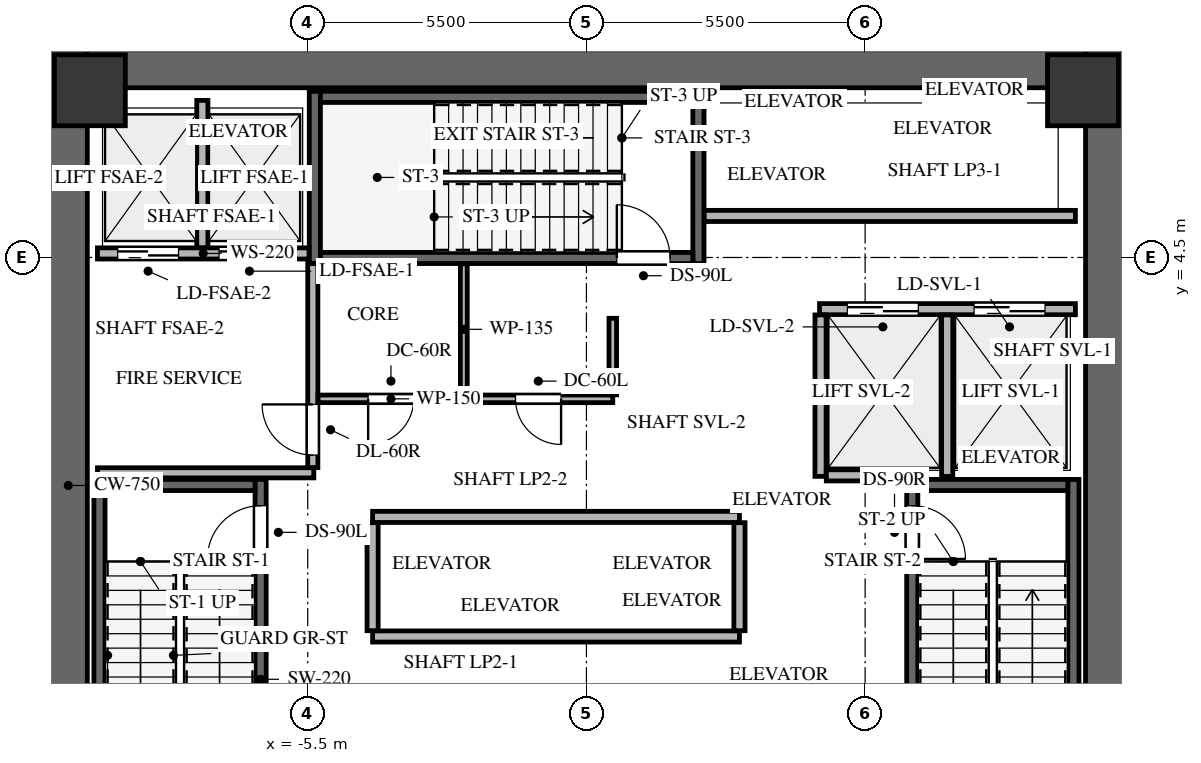
"""IFC4 building model, lengths in metres.
Left out: names, types, materials, properties, quantities, classifications, styles, units other than length and angle.
Written with IfcOpenShell. Run it as: python <this file> out.ifc"""

import sys

from ifc_helpers import new_model, si_unit, direction, frame, frame_2d, origin, origin_2d, place, context, subcontext, project, spatial, rectangle, extrude, source, transform, mapped, element, fill, save


model = new_model("IFC4")
c1 = context("Model", 3, precision=1e-05, world=origin(), true_north=direction((0.0, 1.0)))
c2 = subcontext(c1, "Body", "Model", "MODEL_VIEW")
j1 = project(units=[si_unit("LENGTHUNIT", "METRE"), si_unit("PLANEANGLEUNIT", "RADIAN")], contexts=[c1])
p1 = place(None, origin())
s1 = spatial("IfcSite", under=j1, at=p1, CompositionType="ELEMENT")
p2 = place(p1, origin())
s2 = spatial("IfcBuilding", under=s1, at=p2, CompositionType="ELEMENT")
p3 = place(p2, frame((0.0, 0.0, 88.5)))
s3 = spatial("IfcBuildingStorey", under=s2, at=p3, CompositionType="ELEMENT", Elevation=88.5)
for number, where, z_axis, x_axis in (
    (1, (-10.225, -8.6, 0.0), (0.0, 0.0, 1.0), (0.0, 1.0, 0.0)),
    (2, (10.225, -8.6, 0.0), (0.0, 0.0, 1.0), (0.0, 1.0, 0.0)),
):
    element("IfcWall", number, at=place(p3, frame(where, z_axis=z_axis, x_axis=x_axis)), inside=s3, PredefinedType="SHEAR", context=c2, shape_type="SweptSolid", body=[
        extrude(rectangle(XDim=17.2, YDim=0.75, at=frame_2d((8.6, 0.0))), origin(), (0.0, 0.0, 1.0), 4.8),
    ])
p4 = place(p3, frame((-9.85, 8.225, 0.0), z_axis=(0.0, 0.0, 1.0), x_axis=(1.0, 0.0, 0.0)))
e3 = element("IfcWall", 3, at=p4, inside=s3, PredefinedType="SHEAR", context=c2, shape_type="SweptSolid", body=[
    extrude(rectangle(XDim=19.7, YDim=0.75, at=frame_2d((9.85, 0.0))), origin(), (0.0, 0.0, 1.0), 4.8),
])
p5 = place(p3, frame((-6.43, -7.77, -0.3), z_axis=(0.0, 0.0, 1.0), x_axis=(0.0, 1.0, 0.0)))
e4 = element("IfcWall", 4, at=p5, inside=s3, PredefinedType="SHEAR", context=c2, shape_type="SweptSolid", body=[
    extrude(rectangle(XDim=7.89, YDim=0.22, at=frame_2d((3.945, 0.0))), origin(), (0.0, 0.0, 1.0), 4.8),
])
p6 = place(p5, frame((6.32, 0.0, 0.0)))
e5 = element("IfcOpeningElement", 5, at=p6, cuts=e4, PredefinedType="OPENING", context=c2, shape_type="SweptSolid", body=[
    extrude(rectangle(XDim=1.05, YDim=2.15, at=frame_2d((0.525, 1.075))), frame((0.0, 0.12, 0.0), z_axis=(0.0, -1.0, 0.0), x_axis=(1.0, 0.0, 0.0)), (0.0, 0.0, 1.0), 0.24),
])
p7 = place(p3, frame((-9.61, 0.12, -0.3), z_axis=(0.0, 0.0, 1.0), x_axis=(0.0, -1.0, 0.0)))
e6 = element("IfcWall", 6, at=p7, inside=s3, PredefinedType="SHEAR", context=c2, shape_type="SweptSolid", body=[
    extrude(rectangle(XDim=7.89, YDim=0.22, at=frame_2d((3.945, 0.0))), origin(), (0.0, 0.0, 1.0), 4.8),
])
p8 = place(p3, frame((-6.54, 0.01, -0.3), z_axis=(0.0, 0.0, 1.0), x_axis=(-1.0, 0.0, 0.0)))
e7 = element("IfcWall", 7, at=p8, inside=s3, PredefinedType="SHEAR", context=c2, shape_type="SweptSolid", body=[
    extrude(rectangle(XDim=2.96, YDim=0.22, at=frame_2d((1.48, 0.0))), origin(), (0.0, 0.0, 1.0), 4.8),
])
p9 = place(p3, frame((9.61, -7.77, -0.3), z_axis=(0.0, 0.0, 1.0), x_axis=(0.0, 1.0, 0.0)))
e8 = element("IfcWall", 8, at=p9, inside=s3, PredefinedType="SHEAR", context=c2, shape_type="SweptSolid", body=[
    extrude(rectangle(XDim=7.89, YDim=0.22, at=frame_2d((3.945, 0.0))), origin(), (0.0, 0.0, 1.0), 4.8),
])
p10 = place(p3, frame((6.43, 0.12, -0.3), z_axis=(0.0, 0.0, 1.0), x_axis=(0.0, -1.0, 0.0)))
e9 = element("IfcWall", 9, at=p10, inside=s3, PredefinedType="SHEAR", context=c2, shape_type="SweptSolid", body=[
    extrude(rectangle(XDim=7.89, YDim=0.22, at=frame_2d((3.945, 0.0))), origin(), (0.0, 0.0, 1.0), 4.8),
])
p11 = place(p10, frame((0.52, 0.0, 0.0)))
e10 = element("IfcOpeningElement", 10, at=p11, cuts=e9, PredefinedType="OPENING", context=c2, shape_type="SweptSolid", body=[
    extrude(rectangle(XDim=1.05, YDim=2.15, at=frame_2d((0.525, 1.075))), frame((0.0, 0.12, 0.0), z_axis=(0.0, -1.0, 0.0), x_axis=(1.0, 0.0, 0.0)), (0.0, 0.0, 1.0), 0.24),
])
p12 = place(p3, frame((9.5, 0.01, -0.3), z_axis=(0.0, 0.0, 1.0), x_axis=(-1.0, 0.0, 0.0)))
e11 = element("IfcWall", 11, at=p12, inside=s3, PredefinedType="SHEAR", context=c2, shape_type="SweptSolid", body=[
    extrude(rectangle(XDim=2.96, YDim=0.22, at=frame_2d((1.48, 0.0))), origin(), (0.0, 0.0, 1.0), 4.8),
])
for number, where, z_axis, x_axis in (
    (12, (2.21, 4.38, -0.3), (0.0, 0.0, 1.0), (0.0, 1.0, 0.0)),
    (13, (-5.36, 7.78, -0.3), (0.0, 0.0, 1.0), (0.0, -1.0, 0.0)),
):
    element("IfcWall", number, at=place(p3, frame(where, z_axis=z_axis, x_axis=x_axis)), inside=s3, PredefinedType="SHEAR", context=c2, shape_type="SweptSolid", body=[
        extrude(rectangle(XDim=3.4, YDim=0.22, at=frame_2d((1.7, 0.0))), origin(), (0.0, 0.0, 1.0), 4.8),
    ])
p13 = place(p3, frame((-5.25, 4.49, -0.3), z_axis=(0.0, 0.0, 1.0), x_axis=(1.0, 0.0, 0.0)))
e14 = element("IfcWall", 14, at=p13, inside=s3, PredefinedType="SHEAR", context=c2, shape_type="SweptSolid", body=[
    extrude(rectangle(XDim=7.35, YDim=0.22, at=frame_2d((3.675, 0.0))), origin(), (0.0, 0.0, 1.0), 4.8),
])
p14 = place(p13, frame((5.85, 0.0, 0.0)))
e15 = element("IfcOpeningElement", 15, at=p14, cuts=e14, PredefinedType="OPENING", context=c2, shape_type="SweptSolid", body=[
    extrude(rectangle(XDim=1.05, YDim=2.15, at=frame_2d((0.525, 1.075))), frame((0.0, 0.12, 0.0), z_axis=(0.0, -1.0, 0.0), x_axis=(1.0, 0.0, 0.0)), (0.0, 0.0, 1.0), 0.24),
])
p15 = place(p3, frame((2.1, 7.67, -0.3), z_axis=(0.0, 0.0, 1.0), x_axis=(-1.0, 0.0, 0.0)))
e16 = element("IfcWall", 16, at=p15, inside=s3, PredefinedType="SHEAR", context=c2, shape_type="SweptSolid", body=[
    extrude(rectangle(XDim=7.35, YDim=0.22, at=frame_2d((3.675, 0.0))), origin(), (0.0, 0.0, 1.0), 4.8),
])
m1 = source(origin(), c2, "Body", "SweptSolid", [
    extrude(rectangle(XDim=1.4, YDim=1.4, at=origin_2d()), origin(), (0.0, 0.0, 1.0), 4.8),
])
for number, where, z_axis, x_axis in (
    (17, (9.8, 7.8, -0.3), (0.0, 0.0, 1.0), (1.0, 0.0, 0.0)),
    (18, (-9.8, 7.8, -0.3), (0.0, 0.0, 1.0), (1.0, 0.0, 0.0)),
):
    element("IfcColumn", number, at=place(p3, frame(where, z_axis=z_axis, x_axis=x_axis)), inside=s3, PredefinedType="COLUMN", context=c2, shape_type="MappedRepresentation", body=[
        mapped(m1, transform((0.0, 0.0, 0.0), x_axis=(1.0, 0.0, 0.0), y_axis=(0.0, 1.0, 0.0), z_axis=(0.0, 0.0, 1.0), scale=1.0)),
    ])
p16 = place(p3, frame((-9.65, 4.58, 0.0), z_axis=(0.0, 0.0, 1.0), x_axis=(1.0, 0.0, 0.0)))
e19 = element("IfcWall", 19, at=p16, inside=s3, PredefinedType="SOLIDWALL", context=c2, shape_type="SweptSolid", body=[
    extrude(rectangle(XDim=4.175, YDim=0.22, at=frame_2d((2.087, 0.0))), origin(), (0.0, 0.0, 1.0), 4.485),
])
p17 = place(p16, frame((0.4, 0.0, 0.0)))
e20 = element("IfcOpeningElement", 20, at=p17, cuts=e19, PredefinedType="OPENING", context=c2, shape_type="SweptSolid", body=[
    extrude(rectangle(XDim=1.2, YDim=2.15, at=frame_2d((0.6, 1.075))), frame((0.0, 0.12, 0.0), z_axis=(0.0, -1.0, 0.0), x_axis=(1.0, 0.0, 0.0)), (0.0, 0.0, 1.0), 0.24),
])
p18 = place(p16, frame((2.4, 0.0, 0.0)))
e21 = element("IfcOpeningElement", 21, at=p18, cuts=e19, PredefinedType="OPENING", context=c2, shape_type="SweptSolid", body=[
    extrude(rectangle(XDim=1.2, YDim=2.15, at=frame_2d((0.6, 1.075))), frame((0.0, 0.12, 0.0), z_axis=(0.0, -1.0, 0.0), x_axis=(1.0, 0.0, 0.0)), (0.0, 0.0, 1.0), 0.24),
])
p19 = place(p3, frame((-7.58, 4.694, 0.0), z_axis=(0.0, 0.0, 1.0), x_axis=(0.0, 1.0, 0.0)))
e22 = element("IfcWall", 22, at=p19, inside=s3, PredefinedType="SOLIDWALL", context=c2, shape_type="SweptSolid", body=[
    extrude(rectangle(XDim=2.906, YDim=0.22, at=frame_2d((1.453, 0.0))), origin(), (0.0, 0.0, 1.0), 4.485),
])
p20 = place(p3, frame((-9.65, 0.25, 0.0), z_axis=(0.0, 0.0, 1.0), x_axis=(1.0, 0.0, 0.0)))
e23 = element("IfcWall", 23, at=p20, inside=s3, PredefinedType="SOLIDWALL", context=c2, shape_type="SweptSolid", body=[
    extrude(rectangle(XDim=4.27, YDim=0.2, at=frame_2d((2.135, 0.0))), origin(), (0.0, 0.0, 1.0), 4.485),
])
p21 = place(p3, frame((-5.4, 0.354, 0.0), z_axis=(0.0, 0.0, 1.0), x_axis=(0.0, 1.0, 0.0)))
e24 = element("IfcWall", 24, at=p21, inside=s3, PredefinedType="SOLIDWALL", context=c2, shape_type="SweptSolid", body=[
    extrude(rectangle(XDim=4.026, YDim=0.2, at=frame_2d((2.013, 0.0))), origin(), (0.0, 0.0, 1.0), 4.485),
])
p22 = place(p21, frame((0.246, 0.0, 0.0)))
e25 = element("IfcOpeningElement", 25, at=p22, cuts=e24, PredefinedType="OPENING", context=c2, shape_type="SweptSolid", body=[
    extrude(rectangle(XDim=1.0, YDim=2.15, at=frame_2d((0.5, 1.075))), frame((0.0, 0.11, 0.0), z_axis=(0.0, -1.0, 0.0), x_axis=(1.0, 0.0, 0.0)), (0.0, 0.0, 1.0), 0.22),
])
p23 = place(p3, frame((4.6, 3.48, 0.0), z_axis=(0.0, 0.0, 1.0), x_axis=(1.0, 0.0, 0.0)))
e26 = element("IfcWall", 26, at=p23, inside=s3, PredefinedType="SOLIDWALL", context=c2, shape_type="SweptSolid", body=[
    extrude(rectangle(XDim=5.05, YDim=0.22, at=frame_2d((2.525, 0.0))), origin(), (0.0, 0.0, 1.0), 4.485),
])
p24 = place(p23, frame((0.55, 0.0, 0.0)))
e27 = element("IfcOpeningElement", 27, at=p24, cuts=e26, PredefinedType="OPENING", context=c2, shape_type="SweptSolid", body=[
    extrude(rectangle(XDim=1.4, YDim=2.15, at=frame_2d((0.7, 1.075))), frame((0.0, 0.12, 0.0), z_axis=(0.0, -1.0, 0.0), x_axis=(1.0, 0.0, 0.0)), (0.0, 0.0, 1.0), 0.24),
])
p25 = place(p23, frame((3.05, 0.0, 0.0)))
e28 = element("IfcOpeningElement", 28, at=p25, cuts=e26, PredefinedType="OPENING", context=c2, shape_type="SweptSolid", body=[
    extrude(rectangle(XDim=1.4, YDim=2.15, at=frame_2d((0.7, 1.075))), frame((0.0, 0.12, 0.0), z_axis=(0.0, -1.0, 0.0), x_axis=(1.0, 0.0, 0.0)), (0.0, 0.0, 1.0), 0.24),
])
for number, where, z_axis, x_axis in (
    (29, (4.62, 0.18, 0.0), (0.0, 0.0, 1.0), (0.0, 1.0, 0.0)),
    (30, (7.12, 0.18, 0.0), (0.0, 0.0, 1.0), (0.0, 1.0, 0.0)),
):
    element("IfcWall", number, at=place(p3, frame(where, z_axis=z_axis, x_axis=x_axis)), inside=s3, PredefinedType="SOLIDWALL", context=c2, shape_type="SweptSolid", body=[
        extrude(rectangle(XDim=3.186, YDim=0.22, at=frame_2d((1.593, 0.0))), origin(), (0.0, 0.0, 1.0), 4.485),
    ])
p26 = place(p3, frame((4.734, 0.2, 0.0), z_axis=(0.0, 0.0, 1.0), x_axis=(1.0, 0.0, 0.0)))
e31 = element("IfcWall", 31, at=p26, inside=s3, PredefinedType="SOLIDWALL", context=c2, shape_type="SweptSolid", body=[
    extrude(rectangle(XDim=1.666, YDim=0.22, at=frame_2d((0.833, 0.0))), origin(), (0.0, 0.0, 1.0), 4.485),
])
for number, where, z_axis, x_axis in (
    (32, (-4.22, -2.98, 0.0), (0.0, 0.0, 1.0), (1.0, 0.0, 0.0)),
    (33, (-4.22, -0.62, 0.0), (0.0, 0.0, 1.0), (1.0, 0.0, 0.0)),
):
    element("IfcWall", number, at=place(p3, frame(where, z_axis=z_axis, x_axis=x_axis)), inside=s3, PredefinedType="SOLIDWALL", context=c2, shape_type="SweptSolid", body=[
        extrude(rectangle(XDim=7.24, YDim=0.22, at=frame_2d((3.62, 0.0))), origin(), (0.0, 0.0, 1.0), 4.485),
    ])
for number, where, z_axis, x_axis in (
    (34, (-4.22, -2.866, 0.0), (0.0, 0.0, 1.0), (0.0, 1.0, 0.0)),
    (35, (3.02, -2.866, 0.0), (0.0, 0.0, 1.0), (0.0, 1.0, 0.0)),
):
    element("IfcWall", number, at=place(p3, frame(where, z_axis=z_axis, x_axis=x_axis)), inside=s3, PredefinedType="SOLIDWALL", context=c2, shape_type="SweptSolid", body=[
        extrude(rectangle(XDim=2.132, YDim=0.22, at=frame_2d((1.066, 0.0))), origin(), (0.0, 0.0, 1.0), 4.485),
    ])
p27 = place(p3, frame((2.325, 5.32, 0.0), z_axis=(0.0, 0.0, 1.0), x_axis=(1.0, 0.0, 0.0)))
e36 = element("IfcWall", 36, at=p27, inside=s3, PredefinedType="SOLIDWALL", context=c2, shape_type="SweptSolid", body=[
    extrude(rectangle(XDim=7.325, YDim=0.22, at=frame_2d((3.663, 0.0))), origin(), (0.0, 0.0, 1.0), 4.485),
])
p28 = place(p3, frame((-2.42, 1.71, 0.0), z_axis=(0.0, 0.0, 1.0), x_axis=(-1.0, 0.0, 0.0)))
e37 = element("IfcWall", 37, at=p28, inside=s3, PredefinedType="PARTITIONING", context=c2, shape_type="SweptSolid", body=[
    extrude(rectangle(XDim=2.876, YDim=0.15, at=frame_2d((1.438, 0.0))), origin(), (0.0, 0.0, 1.0), 4.485),
])
p29 = place(p28, frame((0.988, 0.0, 0.0)))
e38 = element("IfcOpeningElement", 38, at=p29, cuts=e37, PredefinedType="OPENING", context=c2, shape_type="SweptSolid", body=[
    extrude(rectangle(XDim=0.9, YDim=2.05, at=frame_2d((0.45, 1.025))), frame((0.0, 0.085, 0.0), z_axis=(0.0, -1.0, 0.0), x_axis=(1.0, 0.0, 0.0)), (0.0, 0.0, 1.0), 0.17),
])
p30 = place(p3, frame((0.52, 1.71, 0.0), z_axis=(0.0, 0.0, 1.0), x_axis=(-1.0, 0.0, 0.0)))
e39 = element("IfcWall", 39, at=p30, inside=s3, PredefinedType="PARTITIONING", context=c2, shape_type="SweptSolid", body=[
    extrude(rectangle(XDim=2.94, YDim=0.15, at=frame_2d((1.47, 0.0))), origin(), (0.0, 0.0, 1.0), 4.485),
])
p31 = place(p30, frame((1.02, 0.0, 0.0)))
e40 = element("IfcOpeningElement", 40, at=p31, cuts=e39, PredefinedType="OPENING", context=c2, shape_type="SweptSolid", body=[
    extrude(rectangle(XDim=0.9, YDim=2.05, at=frame_2d((0.45, 1.025))), frame((0.0, 0.085, 0.0), z_axis=(0.0, -1.0, 0.0), x_axis=(1.0, 0.0, 0.0)), (0.0, 0.0, 1.0), 0.17),
])
p32 = place(p3, frame((0.52, 3.3, 0.0), z_axis=(0.0, 0.0, 1.0), x_axis=(0.0, -1.0, 0.0)))
e41 = element("IfcWall", 41, at=p32, inside=s3, PredefinedType="PARTITIONING", context=c2, shape_type="SweptSolid", body=[
    extrude(rectangle(XDim=1.511, YDim=0.15, at=frame_2d((0.755, 0.0))), origin(), (0.0, 0.0, 1.0), 4.485),
])
p33 = place(p3, frame((-2.42, 4.375, 0.0), z_axis=(0.0, 0.0, 1.0), x_axis=(0.0, -1.0, 0.0)))
e42 = element("IfcWall", 42, at=p33, inside=s3, PredefinedType="PARTITIONING", context=c2, shape_type="SweptSolid", body=[
    extrude(rectangle(XDim=2.586, YDim=0.135, at=frame_2d((1.293, 0.0))), origin(), (0.0, 0.0, 1.0), 4.485),
])
m2 = source(origin(), c2, "Body", "SweptSolid", [
    extrude(rectangle(XDim=1.05, YDim=2.15, at=frame_2d((0.525, 1.075))), frame((0.0, 0.025, 0.0), z_axis=(0.0, -1.0, 0.0), x_axis=(1.0, 0.0, 0.0)), (0.0, 0.0, 1.0), 0.05),
])
p34 = place(p6, origin())
e43 = element("IfcDoor", 43, at=p34, inside=s3, OperationType="SINGLE_SWING_LEFT", PredefinedType="DOOR", context=c2, shape_type="MappedRepresentation", body=[
    mapped(m2, transform((0.0, 0.0, 0.0), x_axis=(1.0, 0.0, 0.0), y_axis=(0.0, 1.0, 0.0), z_axis=(0.0, 0.0, 1.0), scale=1.0)),
])
fill(e5, e43)
m3 = source(origin(), c2, "Body", "SweptSolid", [
    extrude(rectangle(XDim=1.05, YDim=2.15, at=frame_2d((0.525, 1.075))), frame((0.0, 0.025, 0.0), z_axis=(0.0, -1.0, 0.0), x_axis=(1.0, 0.0, 0.0)), (0.0, 0.0, 1.0), 0.05),
])
p35 = place(p11, origin())
e44 = element("IfcDoor", 44, at=p35, inside=s3, OperationType="SINGLE_SWING_RIGHT", PredefinedType="DOOR", context=c2, shape_type="MappedRepresentation", body=[
    mapped(m3, transform((0.0, 0.0, 0.0), x_axis=(1.0, 0.0, 0.0), y_axis=(0.0, 1.0, 0.0), z_axis=(0.0, 0.0, 1.0), scale=1.0)),
])
fill(e10, e44)
p36 = place(p14, origin())
e45 = element("IfcDoor", 45, at=p36, inside=s3, OperationType="SINGLE_SWING_LEFT", PredefinedType="DOOR", context=c2, shape_type="MappedRepresentation", body=[
    mapped(m2, transform((0.0, 0.0, 0.0), x_axis=(1.0, 0.0, 0.0), y_axis=(0.0, 1.0, 0.0), z_axis=(0.0, 0.0, 1.0), scale=1.0)),
])
fill(e15, e45)
m4 = source(origin(), c2, "Body", "SweptSolid", [
    extrude(rectangle(XDim=1.2, YDim=2.15, at=frame_2d((0.6, 1.075))), frame((0.0, 0.025, 0.0), z_axis=(0.0, -1.0, 0.0), x_axis=(1.0, 0.0, 0.0)), (0.0, 0.0, 1.0), 0.05),
])
p37 = place(p17, origin())
e46 = element("IfcDoor", 46, at=p37, inside=s3, OperationType="DOUBLE_DOOR_SLIDING", PredefinedType="DOOR", context=c2, shape_type="MappedRepresentation", body=[
    mapped(m4, transform((0.0, 0.0, 0.0), x_axis=(1.0, 0.0, 0.0), y_axis=(0.0, 1.0, 0.0), z_axis=(0.0, 0.0, 1.0), scale=1.0)),
])
fill(e20, e46)
p38 = place(p18, origin())
e47 = element("IfcDoor", 47, at=p38, inside=s3, OperationType="DOUBLE_DOOR_SLIDING", PredefinedType="DOOR", context=c2, shape_type="MappedRepresentation", body=[
    mapped(m4, transform((0.0, 0.0, 0.0), x_axis=(1.0, 0.0, 0.0), y_axis=(0.0, 1.0, 0.0), z_axis=(0.0, 0.0, 1.0), scale=1.0)),
])
fill(e21, e47)
m5 = source(origin(), c2, "Body", "SweptSolid", [
    extrude(rectangle(XDim=1.0, YDim=2.15, at=frame_2d((0.5, 1.075))), frame((0.0, 0.025, 0.0), z_axis=(0.0, -1.0, 0.0), x_axis=(1.0, 0.0, 0.0)), (0.0, 0.0, 1.0), 0.05),
])
p39 = place(p22, origin())
e48 = element("IfcDoor", 48, at=p39, inside=s3, OperationType="SINGLE_SWING_RIGHT", PredefinedType="DOOR", context=c2, shape_type="MappedRepresentation", body=[
    mapped(m5, transform((0.0, 0.0, 0.0), x_axis=(1.0, 0.0, 0.0), y_axis=(0.0, 1.0, 0.0), z_axis=(0.0, 0.0, 1.0), scale=1.0)),
])
fill(e25, e48)
m6 = source(origin(), c2, "Body", "SweptSolid", [
    extrude(rectangle(XDim=1.4, YDim=2.15, at=frame_2d((0.7, 1.075))), frame((0.0, 0.025, 0.0), z_axis=(0.0, -1.0, 0.0), x_axis=(1.0, 0.0, 0.0)), (0.0, 0.0, 1.0), 0.05),
])
p40 = place(p24, origin())
e49 = element("IfcDoor", 49, at=p40, inside=s3, OperationType="DOUBLE_DOOR_SLIDING", PredefinedType="DOOR", context=c2, shape_type="MappedRepresentation", body=[
    mapped(m6, transform((0.0, 0.0, 0.0), x_axis=(1.0, 0.0, 0.0), y_axis=(0.0, 1.0, 0.0), z_axis=(0.0, 0.0, 1.0), scale=1.0)),
])
fill(e27, e49)
p41 = place(p25, origin())
e50 = element("IfcDoor", 50, at=p41, inside=s3, OperationType="DOUBLE_DOOR_SLIDING", PredefinedType="DOOR", context=c2, shape_type="MappedRepresentation", body=[
    mapped(m6, transform((0.0, 0.0, 0.0), x_axis=(1.0, 0.0, 0.0), y_axis=(0.0, 1.0, 0.0), z_axis=(0.0, 0.0, 1.0), scale=1.0)),
])
fill(e28, e50)
m7 = source(origin(), c2, "Body", "SweptSolid", [
    extrude(rectangle(XDim=0.9, YDim=2.05, at=frame_2d((0.45, 1.025))), frame((0.0, 0.025, 0.0), z_axis=(0.0, -1.0, 0.0), x_axis=(1.0, 0.0, 0.0)), (0.0, 0.0, 1.0), 0.05),
])
p42 = place(p29, origin())
e51 = element("IfcDoor", 51, at=p42, inside=s3, OperationType="SINGLE_SWING_RIGHT", PredefinedType="DOOR", context=c2, shape_type="MappedRepresentation", body=[
    mapped(m7, transform((0.0, 0.0, 0.0), x_axis=(1.0, 0.0, 0.0), y_axis=(0.0, 1.0, 0.0), z_axis=(0.0, 0.0, 1.0), scale=1.0)),
])
fill(e38, e51)
m8 = source(origin(), c2, "Body", "SweptSolid", [
    extrude(rectangle(XDim=0.9, YDim=2.05, at=frame_2d((0.45, 1.025))), frame((0.0, 0.025, 0.0), z_axis=(0.0, -1.0, 0.0), x_axis=(1.0, 0.0, 0.0)), (0.0, 0.0, 1.0), 0.05),
])
p43 = place(p31, origin())
e52 = element("IfcDoor", 52, at=p43, inside=s3, OperationType="SINGLE_SWING_LEFT", PredefinedType="DOOR", context=c2, shape_type="MappedRepresentation", body=[
    mapped(m8, transform((0.0, 0.0, 0.0), x_axis=(1.0, 0.0, 0.0), y_axis=(0.0, 1.0, 0.0), z_axis=(0.0, 0.0, 1.0), scale=1.0)),
])
fill(e40, e52)
save(model, sys.argv[1])
